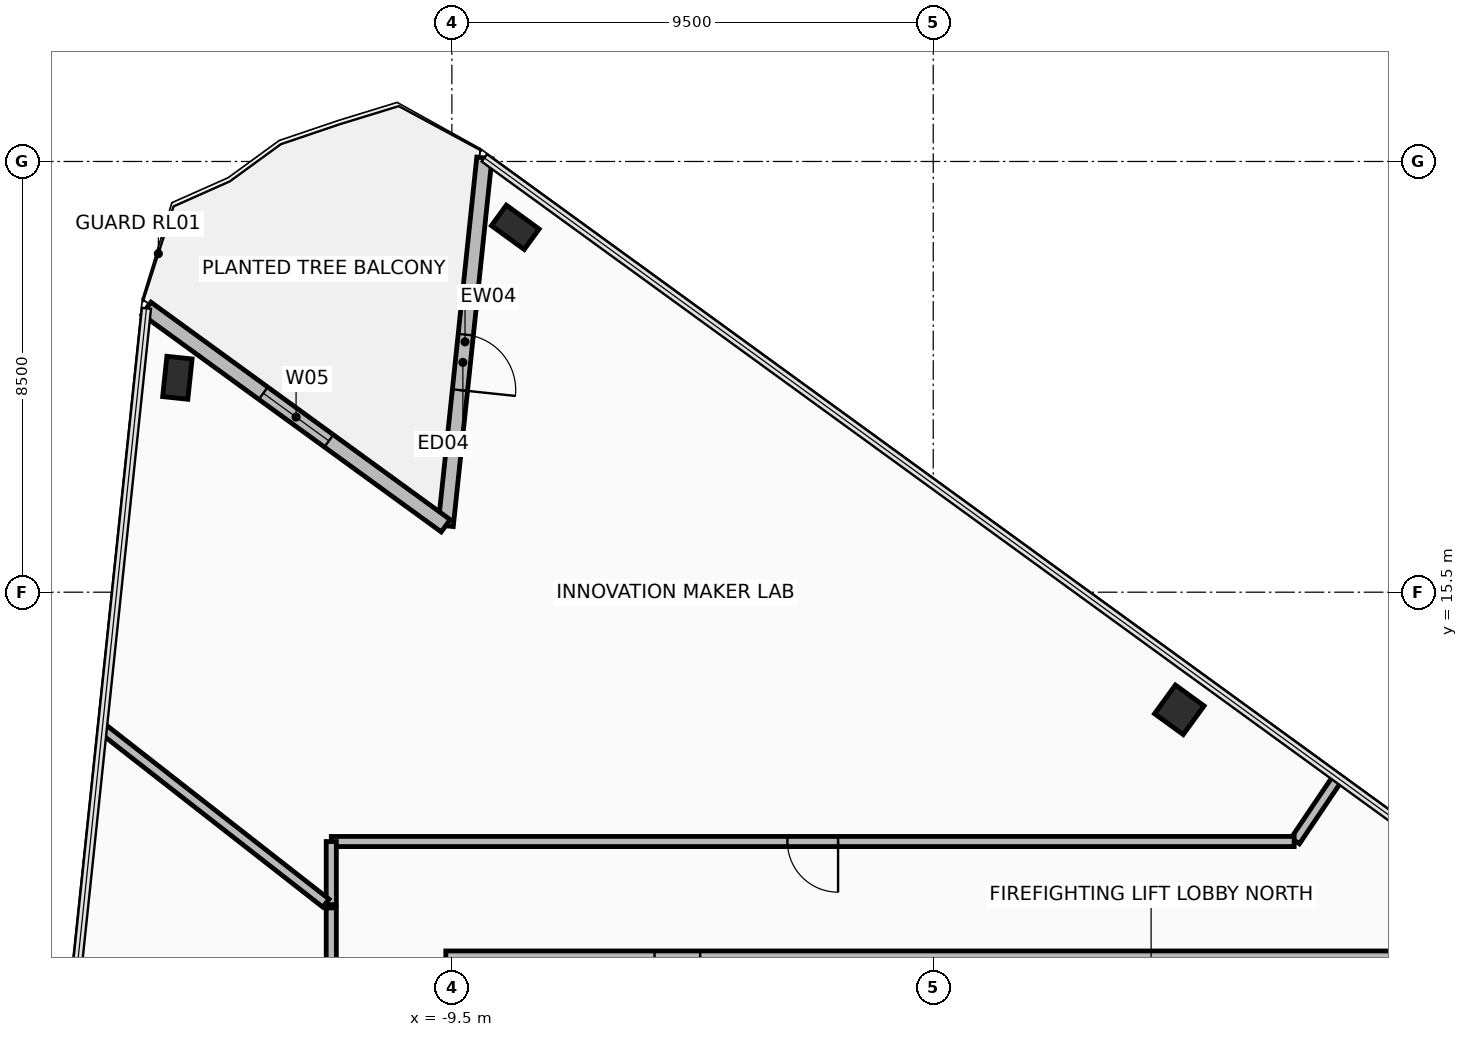
"""IFC4 building model, lengths in metres.
Left out: names, types, materials, properties, quantities, classifications, styles, units other than length and angle.
Written with IfcOpenShell. Run it as: python <this file> out.ifc"""

import sys

from ifc_helpers import new_model, si_unit, direction, frame, frame_2d, origin, origin_2d, place, context, subcontext, project, spatial, rectangle, hollow_rectangle, extrude, element, fill, save


model = new_model("IFC4")
c1 = context("Model", 3, precision=1e-05, world=origin(), true_north=direction((0.0, 1.0)))
c2 = subcontext(c1, "Body", "Model", "MODEL_VIEW")
j1 = project(units=[si_unit("LENGTHUNIT", "METRE"), si_unit("PLANEANGLEUNIT", "RADIAN")], contexts=[c1])
p1 = place(None, origin())
s1 = spatial("IfcSite", under=j1, at=p1, CompositionType="ELEMENT")
p2 = place(p1, origin())
s2 = spatial("IfcBuilding", under=s1, at=p2, CompositionType="ELEMENT")
p3 = place(p2, frame((0.0, 0.0, 123.25)))
s3 = spatial("IfcBuildingStorey", under=s2, at=p3, CompositionType="ELEMENT", Elevation=123.25)
p4 = place(p3, frame((-14.917, 19.731, 0.0), z_axis=(0.0, 0.0, 1.0), x_axis=(0.104530199036, 0.99452171293, 0.0)))
e1 = element("IfcColumn", 1, at=p4, inside=s3, PredefinedType="COLUMN", context=c2, shape_type="SweptSolid", body=[
    extrude(hollow_rectangle(XDim=0.5, YDim=0.8, WallThickness=0.04, at=origin_2d()), origin(), (0.0, 0.0, 1.0), 3.6),
])
p5 = place(p3, frame((4.856, 13.179, 0.0), z_axis=(0.0, 0.0, 1.0), x_axis=(-0.809016994375, 0.587785252292, 0.0)))
e2 = element("IfcColumn", 2, at=p5, inside=s3, PredefinedType="COLUMN", context=c2, shape_type="SweptSolid", body=[
    extrude(hollow_rectangle(XDim=0.7, YDim=0.7, WallThickness=0.04, at=origin_2d()), origin(), (0.0, 0.0, 1.0), 3.6),
])
p6 = place(p3, frame((-8.249, 22.701, 0.0), z_axis=(0.0, 0.0, 1.0), x_axis=(-0.809016994375, 0.587785252292, 0.0)))
e3 = element("IfcColumn", 3, at=p6, inside=s3, PredefinedType="COLUMN", context=c2, shape_type="SweptSolid", body=[
    extrude(hollow_rectangle(XDim=0.5, YDim=0.8, WallThickness=0.04, at=origin_2d()), origin(), (0.0, 0.0, 1.0), 3.6),
])
p7 = place(p3, frame((-8.859, 24.071, 0.0), z_axis=(0.0, 0.0, 1.0), x_axis=(-0.104512431924, -0.9945235802, 0.0)))
e4 = element("IfcWall", 4, at=p7, inside=s3, PredefinedType="STANDARD", context=c2, shape_type="SweptSolid", body=[
    extrude(rectangle(XDim=7.3, YDim=0.3, at=frame_2d((3.65, 0.0))), origin(), (0.0, 0.0, 1.0), 2.705),
])
p8 = place(p7, frame((3.508, 0.0, 0.0)))
e5 = element("IfcOpeningElement", 5, at=p8, cuts=e4, PredefinedType="OPENING", context=c2, shape_type="SweptSolid", body=[
    extrude(rectangle(XDim=1.1, YDim=2.2, at=frame_2d((0.55, 1.1))), frame((0.0, 0.16, 0.0), z_axis=(0.0, -1.0, 0.0), x_axis=(1.0, 0.0, 0.0)), (0.0, 0.0, 1.0), 0.32),
])
p9 = place(p3, frame((-9.622, 16.811, 0.0), z_axis=(0.0, 0.0, 1.0), x_axis=(-0.809002104592, 0.587805745775, 0.0)))
e6 = element("IfcWall", 6, at=p9, inside=s3, PredefinedType="STANDARD", context=c2, shape_type="SweptSolid", body=[
    extrude(rectangle(XDim=7.3, YDim=0.3, at=frame_2d((3.65, 0.0))), origin(), (0.0, 0.0, 1.0), 2.705),
])
p10 = place(p9, frame((2.85, 0.0, 0.325)))
e7 = element("IfcOpeningElement", 7, at=p10, cuts=e6, PredefinedType="OPENING", context=c2, shape_type="SweptSolid", body=[
    extrude(rectangle(XDim=1.6, YDim=2.2, at=frame_2d((0.8, 1.1))), frame((0.0, 0.16, 0.0), z_axis=(0.0, -1.0, 0.0), x_axis=(1.0, 0.0, 0.0)), (0.0, 0.0, 1.0), 0.32),
])
p11 = place(p3, frame((9.62, 8.32, 0.0), z_axis=(0.0, 0.0, 1.0), x_axis=(-1.0, 0.0, 0.0)))
e8 = element("IfcWall", 8, at=p11, inside=s3, PredefinedType="PARTITIONING", context=c2, shape_type="SweptSolid", body=[
    extrude(rectangle(XDim=19.24, YDim=0.2, at=frame_2d((9.62, 0.0))), origin(), (0.0, 0.0, 1.0), 2.755),
])
p12 = place(p11, frame((14.22, 0.0, 0.0)))
e9 = element("IfcOpeningElement", 9, at=p12, cuts=e8, PredefinedType="OPENING", context=c2, shape_type="SweptSolid", body=[
    extrude(rectangle(XDim=0.9, YDim=2.1, at=frame_2d((0.45, 1.05))), frame((0.0, 0.11, 0.0), z_axis=(0.0, -1.0, 0.0), x_axis=(1.0, 0.0, 0.0)), (0.0, 0.0, 1.0), 0.22),
])
p13 = place(p3, frame((7.969, 11.815, 0.0), z_axis=(0.0, 0.0, 1.0), x_axis=(-0.559234205494, -0.829009712492, 0.0)))
e10 = element("IfcWall", 10, at=p13, inside=s3, PredefinedType="PARTITIONING", context=c2, shape_type="SweptSolid", body=[
    extrude(rectangle(XDim=1.476, YDim=0.2, at=frame_2d((0.738, 0.0))), origin(), (0.0, 0.0, 1.0), 2.705),
])
p14 = place(p3, frame((7.123, 10.58, 0.0), z_axis=(0.0, 0.0, 1.0), x_axis=(-1.0, 0.0, 0.0)))
e11 = element("IfcWall", 11, at=p14, inside=s3, PredefinedType="PARTITIONING", context=c2, shape_type="SweptSolid", body=[
    extrude(rectangle(XDim=19.002, YDim=0.2, at=frame_2d((9.501, 0.0))), origin(), (0.0, 0.0, 1.0), 2.755),
])
p15 = place(p14, frame((9.001, 0.0, 0.0)))
e12 = element("IfcOpeningElement", 12, at=p15, cuts=e11, PredefinedType="OPENING", context=c2, shape_type="SweptSolid", body=[
    extrude(rectangle(XDim=1.0, YDim=2.15, at=frame_2d((0.5, 1.075))), frame((0.0, 0.11, 0.0), z_axis=(0.0, -1.0, 0.0), x_axis=(1.0, 0.0, 0.0)), (0.0, 0.0, 1.0), 0.22),
])
p16 = place(p3, frame((-11.88, 10.579, 0.0), z_axis=(0.0, 0.0, 1.0), x_axis=(0.0, -1.0, 0.0)))
e13 = element("IfcWall", 13, at=p16, inside=s3, PredefinedType="PARTITIONING", context=c2, shape_type="SweptSolid", body=[
    extrude(rectangle(XDim=1.246, YDim=0.2, at=frame_2d((0.623, 0.0))), origin(), (0.0, 0.0, 1.0), 3.045),
])
p17 = place(p3, frame((-11.985, 9.364, 0.0), z_axis=(0.0, 0.0, 1.0), x_axis=(-0.788004499682, 0.6156694799, 0.0)))
e14 = element("IfcWall", 14, at=p17, inside=s3, PredefinedType="PARTITIONING", context=c2, shape_type="SweptSolid", body=[
    extrude(rectangle(XDim=5.587, YDim=0.2, at=frame_2d((2.794, 0.0))), origin(), (0.0, 0.0, 1.0), 2.705),
])
p18 = place(p3, frame((-11.88, 9.27, 0.0), z_axis=(0.0, 0.0, 1.0), x_axis=(0.0, -1.0, 0.0)))
e15 = element("IfcWall", 15, at=p18, inside=s3, PredefinedType="PARTITIONING", context=c2, shape_type="SweptSolid", body=[
    extrude(rectangle(XDim=19.849, YDim=0.2, at=frame_2d((9.924, 0.0))), origin(), (0.0, 0.0, 1.0), 2.855),
])
p19 = place(p18, frame((9.424, 0.0, 0.0)))
e16 = element("IfcOpeningElement", 16, at=p19, cuts=e15, PredefinedType="OPENING", context=c2, shape_type="SweptSolid", body=[
    extrude(rectangle(XDim=1.0, YDim=2.15, at=frame_2d((0.5, 1.075))), frame((0.0, 0.11, 0.0), z_axis=(0.0, -1.0, 0.0), x_axis=(1.0, 0.0, 0.0)), (0.0, 0.0, 1.0), 0.22),
])
p20 = place(p8, frame((1.1, 0.0, 0.0), z_axis=(0.0, 0.0, 1.0), x_axis=(-1.0, 0.0, 0.0)))
e17 = element("IfcDoor", 17, at=p20, inside=s3, OperationType="SINGLE_SWING_LEFT", PredefinedType="DOOR", context=c2, shape_type="SweptSolid", body=[
    extrude(rectangle(XDim=1.1, YDim=2.2, at=frame_2d((0.55, 1.1))), frame((0.0, 0.025, 0.0), z_axis=(0.0, -1.0, 0.0), x_axis=(1.0, 0.0, 0.0)), (0.0, 0.0, 1.0), 0.05),
])
fill(e5, e17)
p21 = place(p10, origin())
e18 = element("IfcWindow", 18, at=p21, inside=s3, PartitioningType="SINGLE_PANEL", PredefinedType="WINDOW", context=c2, shape_type="SweptSolid", body=[
    extrude(rectangle(XDim=1.6, YDim=2.2, at=frame_2d((0.8, 1.1))), frame((0.0, 0.03, 0.0), z_axis=(0.0, -1.0, 0.0), x_axis=(1.0, 0.0, 0.0)), (0.0, 0.0, 1.0), 0.06),
])
fill(e7, e18)
p22 = place(p12, origin())
e19 = element("IfcDoor", 19, at=p22, inside=s3, OperationType="SINGLE_SWING_LEFT", PredefinedType="DOOR", context=c2, shape_type="SweptSolid", body=[
    extrude(rectangle(XDim=0.9, YDim=2.1, at=frame_2d((0.45, 1.05))), frame((0.0, 0.025, 0.0), z_axis=(0.0, -1.0, 0.0), x_axis=(1.0, 0.0, 0.0)), (0.0, 0.0, 1.0), 0.05),
])
fill(e9, e19)
p23 = place(p15, origin())
e20 = element("IfcDoor", 20, at=p23, inside=s3, OperationType="SINGLE_SWING_RIGHT", PredefinedType="DOOR", context=c2, shape_type="SweptSolid", body=[
    extrude(rectangle(XDim=1.0, YDim=2.15, at=frame_2d((0.5, 1.075))), frame((0.0, 0.025, 0.0), z_axis=(0.0, -1.0, 0.0), x_axis=(1.0, 0.0, 0.0)), (0.0, 0.0, 1.0), 0.05),
])
fill(e12, e20)
save(model, sys.argv[1])
